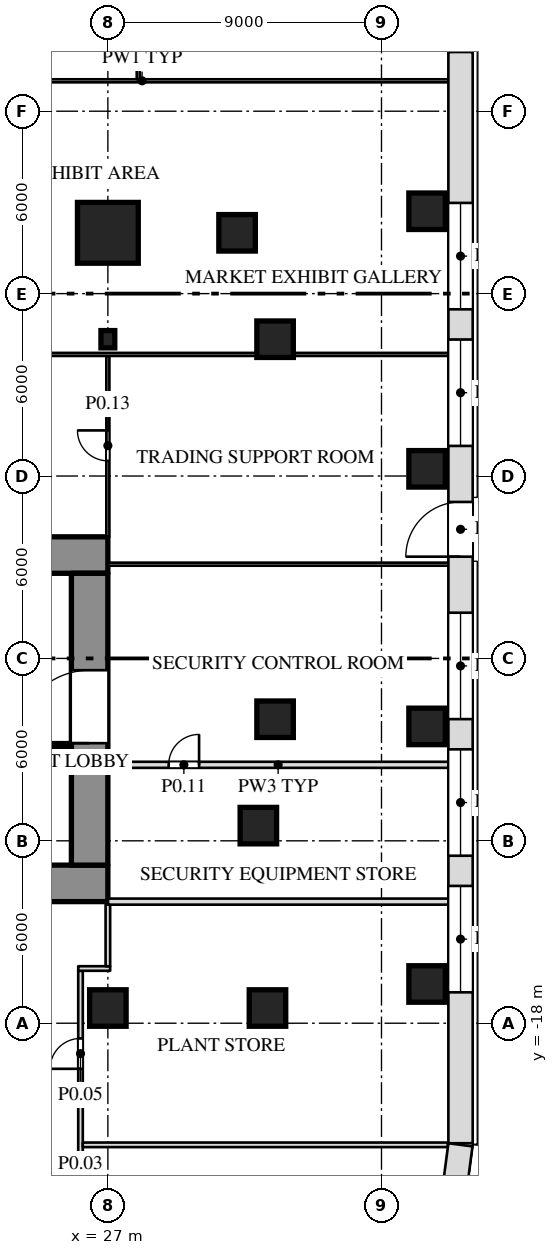
"""IFC4 building model, lengths in metres.
Left out: names, types, materials, properties, quantities, classifications, styles, units other than length and angle.
Written with IfcOpenShell. Run it as: python <this file> out.ifc"""

import sys

from ifc_helpers import new_model, si_unit, direction, frame, frame_2d, origin, origin_2d, place, context, subcontext, project, spatial, rectangle, i_section, extrude, element, fill, save


model = new_model("IFC4")
c1 = context("Model", 3, precision=1e-05, world=origin(), true_north=direction((0.0, 1.0)))
c2 = subcontext(c1, "Body", "Model", "MODEL_VIEW")
j1 = project(units=[si_unit("LENGTHUNIT", "METRE"), si_unit("PLANEANGLEUNIT", "RADIAN")], contexts=[c1])
p1 = place(None, origin())
s1 = spatial("IfcSite", under=j1, at=p1, CompositionType="ELEMENT")
p2 = place(p1, origin())
s2 = spatial("IfcBuilding", under=s1, at=p2, CompositionType="ELEMENT")
p3 = place(p2, origin())
s3 = spatial("IfcBuildingStorey", under=s2, at=p3, CompositionType="ELEMENT", Elevation=0.0)
for number, where, z_axis, x_axis in (
    (1, (27.0, -17.5, 0.0), (0.0, 0.0, 1.0), (1.0, 0.0, 0.0)),
    (2, (32.25, -17.5, 0.0), (0.0, 0.0, 1.0), (1.0, 0.0, 0.0)),
    (3, (37.5, -16.709, 0.0), (0.0, 0.0, 1.0), (1.0, 0.0, 0.0)),
    (4, (31.95, -11.5, 0.0), (0.0, 0.0, 1.0), (1.0, 0.0, 0.0)),
    (5, (37.5, -8.236, 0.0), (0.0, 0.0, 1.0), (1.0, 0.0, 0.0)),
    (6, (32.5, -8.0, 0.0), (0.0, 0.0, 1.0), (1.0, 0.0, 0.0)),
    (7, (37.5, 0.236, 0.0), (0.0, 0.0, 1.0), (1.0, 0.0, 0.0)),
):
    element("IfcColumn", number, at=place(p3, frame(where, z_axis=z_axis, x_axis=x_axis)), inside=s3, PredefinedType="COLUMN", context=c2, shape_type="SweptSolid", body=[
        extrude(rectangle(XDim=1.2, YDim=1.2, at=origin_2d()), origin(), (0.0, 0.0, 1.0), 9.0),
    ])
p4 = place(p3, frame((27.0, 4.5, 0.0), z_axis=(0.0, 0.0, 1.0), x_axis=(1.0, 0.0, 0.0)))
e8 = element("IfcColumn", 8, at=p4, inside=s3, PredefinedType="COLUMN", context=c2, shape_type="SweptSolid", body=[
    extrude(i_section(OverallWidth=0.455, OverallDepth=0.569, WebThickness=0.078, FlangeThickness=0.125, at=origin_2d()), origin(), (0.0, 0.0, 1.0), 9.0),
])
p5 = place(p3, frame((32.5, 4.5, 0.0), z_axis=(0.0, 0.0, 1.0), x_axis=(1.0, 0.0, 0.0)))
e9 = element("IfcColumn", 9, at=p5, inside=s3, PredefinedType="COLUMN", context=c2, shape_type="SweptSolid", body=[
    extrude(rectangle(XDim=1.2, YDim=1.2, at=origin_2d()), origin(), (0.0, 0.0, 1.0), 9.0),
])
p6 = place(p3, frame((27.0, 8.0, 0.0), z_axis=(0.0, 0.0, 1.0), x_axis=(1.0, 0.0, 0.0)))
e10 = element("IfcColumn", 10, at=p6, inside=s3, PredefinedType="COLUMN", context=c2, shape_type="SweptSolid", body=[
    extrude(rectangle(XDim=2.0, YDim=2.0, at=origin_2d()), origin(), (0.0, 0.0, 1.0), 9.0),
])
for number, where, z_axis, x_axis in (
    (11, (31.25, 8.0, 0.0), (0.0, 0.0, 1.0), (1.0, 0.0, 0.0)),
    (12, (37.5, 8.709, 0.0), (0.0, 0.0, 1.0), (1.0, 0.0, 0.0)),
):
    element("IfcColumn", number, at=place(p3, frame(where, z_axis=z_axis, x_axis=x_axis)), inside=s3, PredefinedType="COLUMN", context=c2, shape_type="SweptSolid", body=[
        extrude(rectangle(XDim=1.2, YDim=1.2, at=origin_2d()), origin(), (0.0, 0.0, 1.0), 9.0),
    ])
p7 = place(p3, frame((-27.0, -2.6, 0.0), z_axis=(0.0, 0.0, 1.0), x_axis=(1.0, 0.0, 0.0)))
e13 = element("IfcWall", 13, at=p7, inside=s3, PredefinedType="SHEAR", context=c2, shape_type="SweptSolid", body=[
    extrude(rectangle(XDim=54.0, YDim=1.2, at=frame_2d((27.0, 0.0))), origin(), (0.0, 0.0, 1.0), 8.7),
])
p8 = place(p7, frame((15.15, 0.0, 0.0)))
e14 = element("IfcOpeningElement", 14, at=p8, cuts=e13, PredefinedType="OPENING", context=c2, shape_type="SweptSolid", body=[
    extrude(rectangle(XDim=2.4, YDim=2.1, at=frame_2d((1.2, 1.05))), frame((0.0, 0.612, 0.0), z_axis=(0.0, -1.0, 0.0), x_axis=(1.0, 0.0, 0.0)), (0.0, 0.0, 1.0), 1.224),
])
p9 = place(p7, frame((36.45, 0.0, 0.0)))
e15 = element("IfcOpeningElement", 15, at=p9, cuts=e13, PredefinedType="OPENING", context=c2, shape_type="SweptSolid", body=[
    extrude(rectangle(XDim=2.4, YDim=2.1, at=frame_2d((1.2, 1.05))), frame((0.0, 0.612, 0.0), z_axis=(0.0, -1.0, 0.0), x_axis=(1.0, 0.0, 0.0)), (0.0, 0.0, 1.0), 1.224),
])
p10 = place(p3, frame((-27.0, -13.4, 0.0), z_axis=(0.0, 0.0, 1.0), x_axis=(1.0, 0.0, 0.0)))
e16 = element("IfcWall", 16, at=p10, inside=s3, PredefinedType="SHEAR", context=c2, shape_type="SweptSolid", body=[
    extrude(rectangle(XDim=54.0, YDim=1.2, at=frame_2d((27.0, 0.0))), origin(), (0.0, 0.0, 1.0), 8.7),
])
p11 = place(p10, frame((7.075, 0.0, 0.0)))
e17 = element("IfcOpeningElement", 17, at=p11, cuts=e16, PredefinedType="OPENING", context=c2, shape_type="SweptSolid", body=[
    extrude(rectangle(XDim=1.4, YDim=2.1, at=frame_2d((0.7, 1.05))), frame((0.0, 0.612, 0.0), z_axis=(0.0, -1.0, 0.0), x_axis=(1.0, 0.0, 0.0)), (0.0, 0.0, 1.0), 1.224),
])
p12 = place(p10, frame((16.45, 0.0, 0.0)))
e18 = element("IfcOpeningElement", 18, at=p12, cuts=e16, PredefinedType="OPENING", context=c2, shape_type="SweptSolid", body=[
    extrude(rectangle(XDim=1.0, YDim=2.1, at=frame_2d((0.5, 1.05))), frame((0.0, 0.612, 0.0), z_axis=(0.0, -1.0, 0.0), x_axis=(1.0, 0.0, 0.0)), (0.0, 0.0, 1.0), 1.224),
])
p13 = place(p10, frame((18.525, 0.0, 0.0)))
e19 = element("IfcOpeningElement", 19, at=p13, cuts=e16, PredefinedType="OPENING", context=c2, shape_type="SweptSolid", body=[
    extrude(rectangle(XDim=1.4, YDim=2.1, at=frame_2d((0.7, 1.05))), frame((0.0, 0.612, 0.0), z_axis=(0.0, -1.0, 0.0), x_axis=(1.0, 0.0, 0.0)), (0.0, 0.0, 1.0), 1.224),
])
p14 = place(p10, frame((34.075, 0.0, 0.0)))
e20 = element("IfcOpeningElement", 20, at=p14, cuts=e16, PredefinedType="OPENING", context=c2, shape_type="SweptSolid", body=[
    extrude(rectangle(XDim=1.4, YDim=2.1, at=frame_2d((0.7, 1.05))), frame((0.0, 0.612, 0.0), z_axis=(0.0, -1.0, 0.0), x_axis=(1.0, 0.0, 0.0)), (0.0, 0.0, 1.0), 1.224),
])
p15 = place(p10, frame((36.55, 0.0, 0.0)))
e21 = element("IfcOpeningElement", 21, at=p15, cuts=e16, PredefinedType="OPENING", context=c2, shape_type="SweptSolid", body=[
    extrude(rectangle(XDim=1.0, YDim=2.1, at=frame_2d((0.5, 1.05))), frame((0.0, 0.612, 0.0), z_axis=(0.0, -1.0, 0.0), x_axis=(1.0, 0.0, 0.0)), (0.0, 0.0, 1.0), 1.224),
])
p16 = place(p10, frame((45.525, 0.0, 0.0)))
e22 = element("IfcOpeningElement", 22, at=p16, cuts=e16, PredefinedType="OPENING", context=c2, shape_type="SweptSolid", body=[
    extrude(rectangle(XDim=1.4, YDim=2.1, at=frame_2d((0.7, 1.05))), frame((0.0, 0.612, 0.0), z_axis=(0.0, -1.0, 0.0), x_axis=(1.0, 0.0, 0.0)), (0.0, 0.0, 1.0), 1.224),
])
p17 = place(p3, frame((26.4, -12.8, 0.0), z_axis=(0.0, 0.0, 1.0), x_axis=(0.0, 1.0, 0.0)))
e23 = element("IfcWall", 23, at=p17, inside=s3, PredefinedType="SHEAR", context=c2, shape_type="SweptSolid", body=[
    extrude(rectangle(XDim=9.6, YDim=1.2, at=frame_2d((4.8, 0.0))), origin(), (0.0, 0.0, 1.0), 8.7),
])
p18 = place(p17, frame((4.012, 0.0, 0.0)))
e24 = element("IfcOpeningElement", 24, at=p18, cuts=e23, PredefinedType="OPENING", context=c2, shape_type="SweptSolid", body=[
    extrude(rectangle(XDim=2.4, YDim=2.1, at=frame_2d((1.2, 1.05))), frame((0.0, 0.612, 0.0), z_axis=(0.0, -1.0, 0.0), x_axis=(1.0, 0.0, 0.0)), (0.0, 0.0, 1.0), 1.224),
])
p19 = place(p3, frame((26.1, -27.2, 0.0), z_axis=(0.0, 0.0, 1.0), x_axis=(0.0, 1.0, 0.0)))
e25 = element("IfcWall", 25, at=p19, inside=s3, PredefinedType="PARTITIONING", context=c2, shape_type="SweptSolid", body=[
    extrude(rectangle(XDim=10.925, YDim=0.15, at=frame_2d((5.462, 0.0))), origin(), (0.0, 0.0, 1.0), 8.7),
])
p20 = place(p19, frame((2.7, 0.0, 0.0)))
e26 = element("IfcOpeningElement", 26, at=p20, cuts=e25, PredefinedType="OPENING", context=c2, shape_type="SweptSolid", body=[
    extrude(rectangle(XDim=1.0, YDim=2.1, at=frame_2d((0.5, 1.05))), frame((0.0, 0.087, 0.0), z_axis=(0.0, -1.0, 0.0), x_axis=(1.0, 0.0, 0.0)), (0.0, 0.0, 1.0), 0.174),
])
p21 = place(p19, frame((7.7, 0.0, 0.0)))
e27 = element("IfcOpeningElement", 27, at=p21, cuts=e25, PredefinedType="OPENING", context=c2, shape_type="SweptSolid", body=[
    extrude(rectangle(XDim=1.0, YDim=2.1, at=frame_2d((0.5, 1.05))), frame((0.0, 0.087, 0.0), z_axis=(0.0, -1.0, 0.0), x_axis=(1.0, 0.0, 0.0)), (0.0, 0.0, 1.0), 0.174),
])
p22 = place(p3, frame((26.175, -22.0, 0.0), z_axis=(0.0, 0.0, 1.0), x_axis=(1.0, 0.0, 0.0)))
e28 = element("IfcWall", 28, at=p22, inside=s3, PredefinedType="PARTITIONING", context=c2, shape_type="SweptSolid", body=[
    extrude(rectangle(XDim=12.005, YDim=0.15, at=frame_2d((6.002, 0.0))), origin(), (0.0, 0.0, 1.0), 8.7),
])
p23 = place(p3, frame((26.025, -16.2, 0.0), z_axis=(0.0, 0.0, 1.0), x_axis=(1.0, 0.0, 0.0)))
e29 = element("IfcWall", 29, at=p23, inside=s3, PredefinedType="PARTITIONING", context=c2, shape_type="SweptSolid", body=[
    extrude(rectangle(XDim=1.05, YDim=0.15, at=frame_2d((0.525, 0.0))), origin(), (0.0, 0.0, 1.0), 8.7),
])
p24 = place(p3, frame((27.0, -16.125, 0.0), z_axis=(0.0, 0.0, 1.0), x_axis=(0.0, 1.0, 0.0)))
e30 = element("IfcWall", 30, at=p24, inside=s3, PredefinedType="PARTITIONING", context=c2, shape_type="SweptSolid", body=[
    extrude(rectangle(XDim=2.025, YDim=0.15, at=frame_2d((1.012, 0.0))), origin(), (0.0, 0.0, 1.0), 8.088),
])
p25 = place(p3, frame((27.005, -14.0, 0.0), z_axis=(0.0, 0.0, 1.0), x_axis=(1.0, 0.0, 0.0)))
e31 = element("IfcWall", 31, at=p25, inside=s3, PredefinedType="PARTITIONING", context=c2, shape_type="SweptSolid", body=[
    extrude(rectangle(XDim=11.195, YDim=0.2, at=frame_2d((5.598, 0.0))), origin(), (0.0, 0.0, 1.0), 8.7),
])
p26 = place(p3, frame((27.0, -9.5, 0.0), z_axis=(0.0, 0.0, 1.0), x_axis=(1.0, 0.0, 0.0)))
e32 = element("IfcWall", 32, at=p26, inside=s3, PredefinedType="PARTITIONING", context=c2, shape_type="SweptSolid", body=[
    extrude(rectangle(XDim=11.2, YDim=0.2, at=frame_2d((5.6, 0.0))), origin(), (0.0, 0.0, 1.0), 8.7),
])
p27 = place(p26, frame((2.0, 0.0, 0.0)))
e33 = element("IfcOpeningElement", 33, at=p27, cuts=e32, PredefinedType="OPENING", context=c2, shape_type="SweptSolid", body=[
    extrude(rectangle(XDim=1.0, YDim=2.1, at=frame_2d((0.5, 1.05))), frame((0.0, 0.112, 0.0), z_axis=(0.0, -1.0, 0.0), x_axis=(1.0, 0.0, 0.0)), (0.0, 0.0, 1.0), 0.224),
])
p28 = place(p3, frame((27.0, -2.9, 0.0), z_axis=(0.0, 0.0, 1.0), x_axis=(1.0, 0.0, 0.0)))
e34 = element("IfcWall", 34, at=p28, inside=s3, PredefinedType="PARTITIONING", context=c2, shape_type="SweptSolid", body=[
    extrude(rectangle(XDim=11.2, YDim=0.1, at=frame_2d((5.6, 0.0))), origin(), (0.0, 0.0, 1.0), 8.7),
])
p29 = place(p3, frame((27.0, -2.0, 0.0), z_axis=(0.0, 0.0, 1.0), x_axis=(0.0, 1.0, 0.0)))
e35 = element("IfcWall", 35, at=p29, inside=s3, PredefinedType="PARTITIONING", context=c2, shape_type="SweptSolid", body=[
    extrude(rectangle(XDim=5.95, YDim=0.1, at=frame_2d((2.975, 0.0))), origin(), (0.0, 0.0, 1.0), 8.088),
])
p30 = place(p29, frame((2.5, 0.0, 0.0)))
e36 = element("IfcOpeningElement", 36, at=p30, cuts=e35, PredefinedType="OPENING", context=c2, shape_type="SweptSolid", body=[
    extrude(rectangle(XDim=1.0, YDim=2.1, at=frame_2d((0.5, 1.05))), frame((0.0, 0.062, 0.0), z_axis=(0.0, -1.0, 0.0), x_axis=(1.0, 0.0, 0.0)), (0.0, 0.0, 1.0), 0.124),
])
p31 = place(p3, frame((17.95, 4.0, 0.0), z_axis=(0.0, 0.0, 1.0), x_axis=(1.0, 0.0, 0.0)))
e37 = element("IfcWall", 37, at=p31, inside=s3, PredefinedType="PARTITIONING", context=c2, shape_type="SweptSolid", body=[
    extrude(rectangle(XDim=13.95, YDim=0.1, at=frame_2d((6.975, 0.0))), origin(), (0.0, 0.0, 1.0), 8.7),
])
p32 = place(p3, frame((33.1, 4.0, 0.0), z_axis=(0.0, 0.0, 1.0), x_axis=(1.0, 0.0, 0.0)))
e38 = element("IfcWall", 38, at=p32, inside=s3, PredefinedType="PARTITIONING", context=c2, shape_type="SweptSolid", body=[
    extrude(rectangle(XDim=5.1, YDim=0.1, at=frame_2d((2.55, 0.0))), origin(), (0.0, 0.0, 1.0), 8.7),
])
p33 = place(p3, frame((18.05, 13.0, 0.0), z_axis=(0.0, 0.0, 1.0), x_axis=(1.0, 0.0, 0.0)))
e39 = element("IfcWall", 39, at=p33, inside=s3, PredefinedType="PARTITIONING", context=c2, shape_type="SweptSolid", body=[
    extrude(rectangle(XDim=20.15, YDim=0.1, at=frame_2d((10.075, 0.0))), origin(), (0.0, 0.0, 1.0), 8.7),
])
p34 = place(p33, frame((4.45, 0.0, 0.0)))
e40 = element("IfcOpeningElement", 40, at=p34, cuts=e39, PredefinedType="OPENING", context=c2, shape_type="SweptSolid", body=[
    extrude(rectangle(XDim=1.0, YDim=2.1, at=frame_2d((0.5, 1.05))), frame((0.0, 0.062, 0.0), z_axis=(0.0, -1.0, 0.0), x_axis=(1.0, 0.0, 0.0)), (0.0, 0.0, 1.0), 0.124),
])
p35 = place(p3, frame((28.0, 13.05, 0.0), z_axis=(0.0, 0.0, 1.0), x_axis=(0.0, 1.0, 0.0)))
e41 = element("IfcWall", 41, at=p35, inside=s3, PredefinedType="PARTITIONING", context=c2, shape_type="SweptSolid", body=[
    extrude(rectangle(XDim=6.15, YDim=0.1, at=frame_2d((3.075, 0.0))), origin(), (0.0, 0.0, 1.0), 8.7),
])
p36 = place(p35, frame((2.55, 0.0, 0.0)))
e42 = element("IfcOpeningElement", 42, at=p36, cuts=e41, PredefinedType="OPENING", context=c2, shape_type="SweptSolid", body=[
    extrude(rectangle(XDim=1.8, YDim=2.1, at=frame_2d((0.9, 1.05))), frame((0.0, 0.062, 0.0), z_axis=(0.0, -1.0, 0.0), x_axis=(1.0, 0.0, 0.0)), (0.0, 0.0, 1.0), 0.124),
])
p37 = place(p3, frame((38.413, -23.396, 0.0), z_axis=(0.0, 0.0, 1.0), x_axis=(0.130517283865, 0.99144603414, 0.0)))
e43 = element("IfcWall", 43, at=p37, inside=s3, PredefinedType="SOLIDWALL", context=c2, shape_type="SweptSolid", body=[
    extrude(rectangle(XDim=1.408, YDim=0.8, at=frame_2d((0.704, 0.0))), origin(), (0.0, 0.0, 1.0), 8.7),
])
p38 = place(p3, frame((38.6, -21.948, 0.0), z_axis=(0.0, 0.0, 1.0), x_axis=(0.0, 1.0, 0.0)))
e44 = element("IfcWall", 44, at=p38, inside=s3, PredefinedType="SOLIDWALL", context=c2, shape_type="SweptSolid", body=[
    extrude(rectangle(XDim=35.895, YDim=0.8, at=frame_2d((17.948, 0.0))), origin(), (0.0, 0.0, 1.0), 8.7),
])
p39 = place(p38, frame((4.964, 0.0, 1.0)))
e45 = element("IfcOpeningElement", 45, at=p39, cuts=e44, PredefinedType="OPENING", context=c2, shape_type="SweptSolid", body=[
    extrude(rectangle(XDim=3.5, YDim=5.5, at=frame_2d((1.75, 2.75))), frame((0.0, 0.412, 0.0), z_axis=(0.0, -1.0, 0.0), x_axis=(1.0, 0.0, 0.0)), (0.0, 0.0, 1.0), 0.824),
])
p40 = place(p38, frame((9.458, 0.0, 1.0)))
e46 = element("IfcOpeningElement", 46, at=p40, cuts=e44, PredefinedType="OPENING", context=c2, shape_type="SweptSolid", body=[
    extrude(rectangle(XDim=3.5, YDim=5.5, at=frame_2d((1.75, 2.75))), frame((0.0, 0.412, 0.0), z_axis=(0.0, -1.0, 0.0), x_axis=(1.0, 0.0, 0.0)), (0.0, 0.0, 1.0), 0.824),
])
p41 = place(p38, frame((13.951, 0.0, 1.0)))
e47 = element("IfcOpeningElement", 47, at=p41, cuts=e44, PredefinedType="OPENING", context=c2, shape_type="SweptSolid", body=[
    extrude(rectangle(XDim=3.5, YDim=5.5, at=frame_2d((1.75, 2.75))), frame((0.0, 0.412, 0.0), z_axis=(0.0, -1.0, 0.0), x_axis=(1.0, 0.0, 0.0)), (0.0, 0.0, 1.0), 0.824),
])
p42 = place(p38, frame((22.938, 0.0, 1.0)))
e48 = element("IfcOpeningElement", 48, at=p42, cuts=e44, PredefinedType="OPENING", context=c2, shape_type="SweptSolid", body=[
    extrude(rectangle(XDim=3.5, YDim=5.5, at=frame_2d((1.75, 2.75))), frame((0.0, 0.412, 0.0), z_axis=(0.0, -1.0, 0.0), x_axis=(1.0, 0.0, 0.0)), (0.0, 0.0, 1.0), 0.824),
])
p43 = place(p38, frame((27.431, 0.0, 1.0)))
e49 = element("IfcOpeningElement", 49, at=p43, cuts=e44, PredefinedType="OPENING", context=c2, shape_type="SweptSolid", body=[
    extrude(rectangle(XDim=3.5, YDim=5.5, at=frame_2d((1.75, 2.75))), frame((0.0, 0.412, 0.0), z_axis=(0.0, -1.0, 0.0), x_axis=(1.0, 0.0, 0.0)), (0.0, 0.0, 1.0), 0.824),
])
p44 = place(p38, frame((19.294, 0.0, 0.0)))
e50 = element("IfcOpeningElement", 50, at=p44, cuts=e44, PredefinedType="OPENING", context=c2, shape_type="SweptSolid", body=[
    extrude(rectangle(XDim=1.8, YDim=2.4, at=frame_2d((0.9, 1.2))), frame((0.0, 0.412, 0.0), z_axis=(0.0, -1.0, 0.0), x_axis=(1.0, 0.0, 0.0)), (0.0, 0.0, 1.0), 0.824),
])
p45 = place(p3, frame((38.597, 14.0, 0.0), z_axis=(0.0, 0.0, 1.0), x_axis=(-0.130517283865, 0.99144603414, 0.0)))
e51 = element("IfcWall", 51, at=p45, inside=s3, PredefinedType="SOLIDWALL", context=c2, shape_type="SweptSolid", body=[
    extrude(rectangle(XDim=1.408, YDim=0.8, at=frame_2d((0.704, 0.0))), origin(), (0.0, 0.0, 1.0), 8.7),
])
p46 = place(p3, frame((18.3, -8.875, 0.0), z_axis=(0.0, 0.0, 1.0), x_axis=(1.0, 0.0, 0.0)))
e52 = element("IfcWall", 52, at=p46, inside=s3, PredefinedType="SHEAR", context=c2, shape_type="SweptSolid", body=[
    extrude(rectangle(XDim=7.5, YDim=0.15, at=frame_2d((3.75, 0.0))), origin(), (0.0, 0.0, 1.0), 8.7),
])
p47 = place(p46, frame((0.225, 0.0, 0.0)))
e53 = element("IfcOpeningElement", 53, at=p47, cuts=e52, PredefinedType="OPENING", context=c2, shape_type="SweptSolid", body=[
    extrude(rectangle(XDim=1.4, YDim=2.1, at=frame_2d((0.7, 1.05))), frame((0.0, 0.087, 0.0), z_axis=(0.0, -1.0, 0.0), x_axis=(1.0, 0.0, 0.0)), (0.0, 0.0, 1.0), 0.174),
])
p48 = place(p21, origin())
e54 = element("IfcDoor", 54, at=p48, inside=s3, OperationType="SINGLE_SWING_LEFT", PredefinedType="DOOR", context=c2, shape_type="SweptSolid", body=[
    extrude(rectangle(XDim=1.0, YDim=2.1, at=frame_2d((0.5, 1.05))), frame((0.0, 0.025, 0.0), z_axis=(0.0, -1.0, 0.0), x_axis=(1.0, 0.0, 0.0)), (0.0, 0.0, 1.0), 0.05),
])
fill(e27, e54)
p49 = place(p27, origin())
e55 = element("IfcDoor", 55, at=p49, inside=s3, OperationType="SINGLE_SWING_RIGHT", PredefinedType="DOOR", context=c2, shape_type="SweptSolid", body=[
    extrude(rectangle(XDim=1.0, YDim=2.1, at=frame_2d((0.5, 1.05))), frame((0.0, 0.025, 0.0), z_axis=(0.0, -1.0, 0.0), x_axis=(1.0, 0.0, 0.0)), (0.0, 0.0, 1.0), 0.05),
])
fill(e33, e55)
p50 = place(p30, origin())
e56 = element("IfcDoor", 56, at=p50, inside=s3, OperationType="SINGLE_SWING_RIGHT", PredefinedType="DOOR", context=c2, shape_type="SweptSolid", body=[
    extrude(rectangle(XDim=1.0, YDim=2.1, at=frame_2d((0.5, 1.05))), frame((0.0, 0.025, 0.0), z_axis=(0.0, -1.0, 0.0), x_axis=(1.0, 0.0, 0.0)), (0.0, 0.0, 1.0), 0.05),
])
fill(e36, e56)
p51 = place(p39, origin())
e57 = element("IfcWindow", 57, at=p51, inside=s3, PartitioningType="SINGLE_PANEL", PredefinedType="WINDOW", context=c2, shape_type="SweptSolid", body=[
    extrude(rectangle(XDim=3.5, YDim=5.5, at=frame_2d((1.75, 2.75))), frame((0.0, 0.03, 0.0), z_axis=(0.0, -1.0, 0.0), x_axis=(1.0, 0.0, 0.0)), (0.0, 0.0, 1.0), 0.06),
])
fill(e45, e57)
p52 = place(p40, origin())
e58 = element("IfcWindow", 58, at=p52, inside=s3, PartitioningType="SINGLE_PANEL", PredefinedType="WINDOW", context=c2, shape_type="SweptSolid", body=[
    extrude(rectangle(XDim=3.5, YDim=5.5, at=frame_2d((1.75, 2.75))), frame((0.0, 0.03, 0.0), z_axis=(0.0, -1.0, 0.0), x_axis=(1.0, 0.0, 0.0)), (0.0, 0.0, 1.0), 0.06),
])
fill(e46, e58)
p53 = place(p41, origin())
e59 = element("IfcWindow", 59, at=p53, inside=s3, PartitioningType="SINGLE_PANEL", PredefinedType="WINDOW", context=c2, shape_type="SweptSolid", body=[
    extrude(rectangle(XDim=3.5, YDim=5.5, at=frame_2d((1.75, 2.75))), frame((0.0, 0.03, 0.0), z_axis=(0.0, -1.0, 0.0), x_axis=(1.0, 0.0, 0.0)), (0.0, 0.0, 1.0), 0.06),
])
fill(e47, e59)
p54 = place(p42, origin())
e60 = element("IfcWindow", 60, at=p54, inside=s3, PartitioningType="SINGLE_PANEL", PredefinedType="WINDOW", context=c2, shape_type="SweptSolid", body=[
    extrude(rectangle(XDim=3.5, YDim=5.5, at=frame_2d((1.75, 2.75))), frame((0.0, 0.03, 0.0), z_axis=(0.0, -1.0, 0.0), x_axis=(1.0, 0.0, 0.0)), (0.0, 0.0, 1.0), 0.06),
])
fill(e48, e60)
p55 = place(p43, origin())
e61 = element("IfcWindow", 61, at=p55, inside=s3, PartitioningType="SINGLE_PANEL", PredefinedType="WINDOW", context=c2, shape_type="SweptSolid", body=[
    extrude(rectangle(XDim=3.5, YDim=5.5, at=frame_2d((1.75, 2.75))), frame((0.0, 0.03, 0.0), z_axis=(0.0, -1.0, 0.0), x_axis=(1.0, 0.0, 0.0)), (0.0, 0.0, 1.0), 0.06),
])
fill(e49, e61)
p56 = place(p44, frame((1.8, 0.0, 0.0), z_axis=(0.0, 0.0, 1.0), x_axis=(-1.0, 0.0, 0.0)))
e62 = element("IfcDoor", 62, at=p56, inside=s3, OperationType="DOUBLE_DOOR_SINGLE_SWING", PredefinedType="DOOR", context=c2, shape_type="SweptSolid", body=[
    extrude(rectangle(XDim=1.8, YDim=2.4, at=frame_2d((0.9, 1.2))), frame((0.0, 0.025, 0.0), z_axis=(0.0, -1.0, 0.0), x_axis=(1.0, 0.0, 0.0)), (0.0, 0.0, 1.0), 0.05),
])
fill(e50, e62)
p57 = place(p18, origin())
e63 = element("IfcDoor", 63, at=p57, inside=s3, OperationType="DOUBLE_DOOR_SINGLE_SWING", PredefinedType="DOOR", context=c2, shape_type="SweptSolid", body=[
    extrude(rectangle(XDim=2.4, YDim=2.1, at=frame_2d((1.2, 1.05))), frame((0.0, 0.025, 0.0), z_axis=(0.0, -1.0, 0.0), x_axis=(1.0, 0.0, 0.0)), (0.0, 0.0, 1.0), 0.05),
])
fill(e24, e63)
save(model, sys.argv[1])
